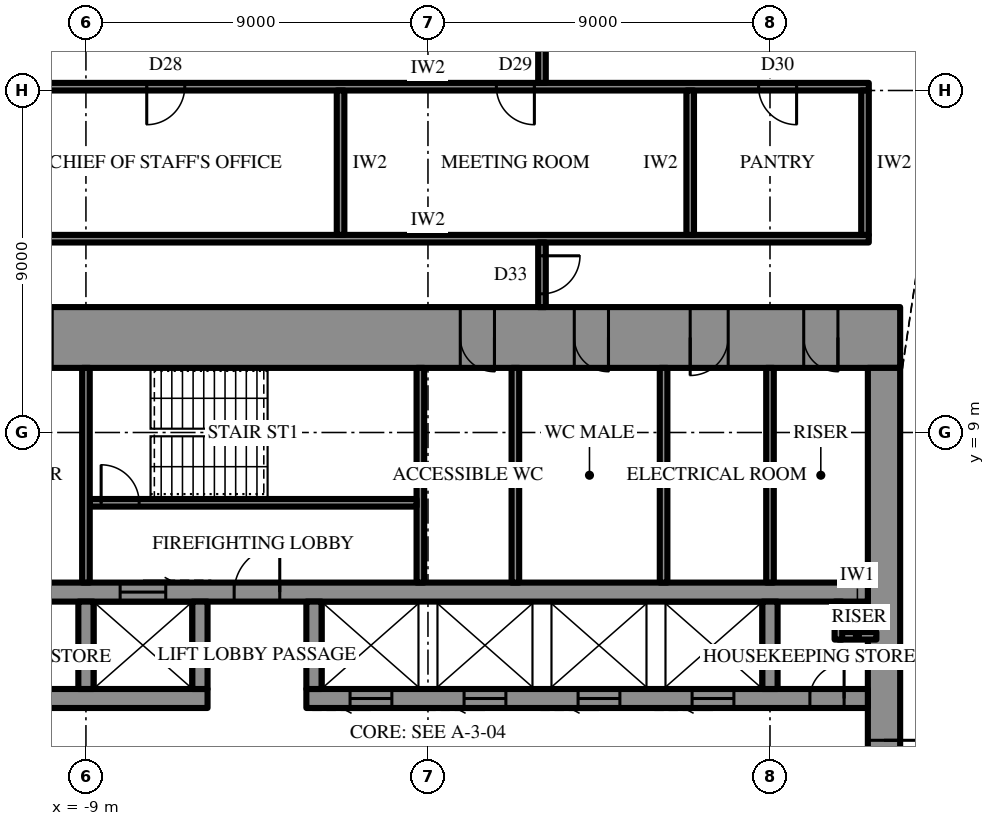
"""IFC4 building model, lengths in metres.
Left out: names, types, materials, properties, quantities, classifications, styles, units other than length and angle.
Written with IfcOpenShell. Run it as: python <this file> out.ifc"""

import sys

from ifc_helpers import new_model, si_unit, direction, frame, frame_2d, origin, place, context, subcontext, project, spatial, rectangle, extrude, element, fill, save


model = new_model("IFC4")
c1 = context("Model", 3, precision=1e-05, world=origin(), true_north=direction((0.0, 1.0)))
c2 = subcontext(c1, "Body", "Model", "MODEL_VIEW")
j1 = project(units=[si_unit("LENGTHUNIT", "METRE"), si_unit("PLANEANGLEUNIT", "RADIAN")], contexts=[c1])
p1 = place(None, origin())
s1 = spatial("IfcSite", under=j1, at=p1, CompositionType="ELEMENT")
p2 = place(p1, origin())
s2 = spatial("IfcBuilding", under=s1, at=p2, CompositionType="ELEMENT")
p3 = place(p2, frame((0.0, 0.0, 366.1)))
s3 = spatial("IfcBuildingStorey", under=s2, at=p3, CompositionType="ELEMENT", Elevation=366.1)
p4 = place(p3, frame((-12.425, 11.5, 0.0), z_axis=(0.0, 0.0, 1.0), x_axis=(1.0, 0.0, 0.0)))
e1 = element("IfcWall", 1, at=p4, inside=s3, PredefinedType="SHEAR", context=c2, shape_type="SweptSolid", body=[
    extrude(rectangle(XDim=24.85, YDim=1.6, at=frame_2d((12.425, 0.0))), origin(), (0.0, 0.0, 1.0), 4.2),
])
p5 = place(p4, frame((13.275, 0.0, 0.0)))
e2 = element("IfcOpeningElement", 2, at=p5, cuts=e1, PredefinedType="OPENING", context=c2, shape_type="SweptSolid", body=[
    extrude(rectangle(XDim=0.9, YDim=2.2, at=frame_2d((0.45, 1.1))), frame((0.0, 0.81, 0.0), z_axis=(0.0, -1.0, 0.0), x_axis=(1.0, 0.0, 0.0)), (0.0, 0.0, 1.0), 1.62),
])
p6 = place(p4, frame((16.275, 0.0, 0.0)))
e3 = element("IfcOpeningElement", 3, at=p6, cuts=e1, PredefinedType="OPENING", context=c2, shape_type="SweptSolid", body=[
    extrude(rectangle(XDim=0.9, YDim=2.2, at=frame_2d((0.45, 1.1))), frame((0.0, 0.81, 0.0), z_axis=(0.0, -1.0, 0.0), x_axis=(1.0, 0.0, 0.0)), (0.0, 0.0, 1.0), 1.62),
])
p7 = place(p4, frame((19.325, 0.0, 0.0)))
e4 = element("IfcOpeningElement", 4, at=p7, cuts=e1, PredefinedType="OPENING", context=c2, shape_type="SweptSolid", body=[
    extrude(rectangle(XDim=1.0, YDim=2.2, at=frame_2d((0.5, 1.1))), frame((0.0, 0.81, 0.0), z_axis=(0.0, -1.0, 0.0), x_axis=(1.0, 0.0, 0.0)), (0.0, 0.0, 1.0), 1.62),
])
p8 = place(p4, frame((1.637, 0.0, 0.0)))
e5 = element("IfcOpeningElement", 5, at=p8, cuts=e1, PredefinedType="OPENING", context=c2, shape_type="SweptSolid", body=[
    extrude(rectangle(XDim=0.9, YDim=2.2, at=frame_2d((0.45, 1.1))), frame((0.0, 0.81, 0.0), z_axis=(0.0, -1.0, 0.0), x_axis=(1.0, 0.0, 0.0)), (0.0, 0.0, 1.0), 1.62),
])
p9 = place(p4, frame((22.312, 0.0, 0.0)))
e6 = element("IfcOpeningElement", 6, at=p9, cuts=e1, PredefinedType="OPENING", context=c2, shape_type="SweptSolid", body=[
    extrude(rectangle(XDim=0.9, YDim=2.2, at=frame_2d((0.45, 1.1))), frame((0.0, 0.81, 0.0), z_axis=(0.0, -1.0, 0.0), x_axis=(1.0, 0.0, 0.0)), (0.0, 0.0, 1.0), 1.62),
])
p10 = place(p3, frame((12.0, -10.7, 0.0), z_axis=(0.0, 0.0, 1.0), x_axis=(0.0, 1.0, 0.0)))
e7 = element("IfcWall", 7, at=p10, inside=s3, PredefinedType="SHEAR", context=c2, shape_type="SweptSolid", body=[
    extrude(rectangle(XDim=21.4, YDim=0.85, at=frame_2d((10.7, 0.0))), origin(), (0.0, 0.0, 1.0), 4.2),
])
p11 = place(p10, frame((9.8, 0.0, 0.0)))
e8 = element("IfcOpeningElement", 8, at=p11, cuts=e7, PredefinedType="OPENING", context=c2, shape_type="SweptSolid", body=[
    extrude(rectangle(XDim=1.8, YDim=2.4, at=frame_2d((0.9, 1.2))), frame((0.0, 0.435, 0.0), z_axis=(0.0, -1.0, 0.0), x_axis=(1.0, 0.0, 0.0)), (0.0, 0.0, 1.0), 0.87),
])
p12 = place(p3, frame((-11.575, 2.0, 0.0), z_axis=(0.0, 0.0, 1.0), x_axis=(1.0, 0.0, 0.0)))
e9 = element("IfcWall", 9, at=p12, inside=s3, PredefinedType="SHEAR", context=c2, shape_type="SweptSolid", body=[
    extrude(rectangle(XDim=5.775, YDim=0.5, at=frame_2d((2.887, 0.0))), origin(), (0.0, 0.0, 1.0), 4.2),
])
p13 = place(p12, frame((0.625, 0.0, 0.0)))
e10 = element("IfcOpeningElement", 10, at=p13, cuts=e9, PredefinedType="OPENING", context=c2, shape_type="SweptSolid", body=[
    extrude(rectangle(XDim=0.9, YDim=2.2, at=frame_2d((0.45, 1.1))), frame((0.0, 0.26, 0.0), z_axis=(0.0, -1.0, 0.0), x_axis=(1.0, 0.0, 0.0)), (0.0, 0.0, 1.0), 0.52),
])
p14 = place(p3, frame((-3.2, 2.0, 0.0), z_axis=(0.0, 0.0, 1.0), x_axis=(1.0, 0.0, 0.0)))
e11 = element("IfcWall", 11, at=p14, inside=s3, PredefinedType="SHEAR", context=c2, shape_type="SweptSolid", body=[
    extrude(rectangle(XDim=14.775, YDim=0.5, at=frame_2d((7.387, 0.0))), origin(), (0.0, 0.0, 1.0), 4.2),
])
p15 = place(p14, frame((13.25, 0.0, 0.0)))
e12 = element("IfcOpeningElement", 12, at=p15, cuts=e11, PredefinedType="OPENING", context=c2, shape_type="SweptSolid", body=[
    extrude(rectangle(XDim=0.9, YDim=2.2, at=frame_2d((0.45, 1.1))), frame((0.0, 0.26, 0.0), z_axis=(0.0, -1.0, 0.0), x_axis=(1.0, 0.0, 0.0)), (0.0, 0.0, 1.0), 0.52),
])
p16 = place(p14, frame((1.15, 0.0, 0.0)))
e13 = element("IfcOpeningElement", 13, at=p16, cuts=e11, PredefinedType="OPENING", context=c2, shape_type="SweptSolid", body=[
    extrude(rectangle(XDim=1.1, YDim=2.2, at=frame_2d((0.55, 1.1))), frame((0.0, 0.26, 0.0), z_axis=(0.0, -1.0, 0.0), x_axis=(1.0, 0.0, 0.0)), (0.0, 0.0, 1.0), 0.52),
])
p17 = place(p14, frame((4.15, 0.0, 0.0)))
e14 = element("IfcOpeningElement", 14, at=p17, cuts=e11, PredefinedType="OPENING", context=c2, shape_type="SweptSolid", body=[
    extrude(rectangle(XDim=1.1, YDim=2.2, at=frame_2d((0.55, 1.1))), frame((0.0, 0.26, 0.0), z_axis=(0.0, -1.0, 0.0), x_axis=(1.0, 0.0, 0.0)), (0.0, 0.0, 1.0), 0.52),
])
p18 = place(p14, frame((7.15, 0.0, 0.0)))
e15 = element("IfcOpeningElement", 15, at=p18, cuts=e11, PredefinedType="OPENING", context=c2, shape_type="SweptSolid", body=[
    extrude(rectangle(XDim=1.1, YDim=2.2, at=frame_2d((0.55, 1.1))), frame((0.0, 0.26, 0.0), z_axis=(0.0, -1.0, 0.0), x_axis=(1.0, 0.0, 0.0)), (0.0, 0.0, 1.0), 0.52),
])
p19 = place(p14, frame((10.15, 0.0, 0.0)))
e16 = element("IfcOpeningElement", 16, at=p19, cuts=e11, PredefinedType="OPENING", context=c2, shape_type="SweptSolid", body=[
    extrude(rectangle(XDim=1.1, YDim=2.2, at=frame_2d((0.55, 1.1))), frame((0.0, 0.26, 0.0), z_axis=(0.0, -1.0, 0.0), x_axis=(1.0, 0.0, 0.0)), (0.0, 0.0, 1.0), 0.52),
])
p20 = place(p3, frame((-11.575, 4.8, 0.0), z_axis=(0.0, 0.0, 1.0), x_axis=(1.0, 0.0, 0.0)))
e17 = element("IfcWall", 17, at=p20, inside=s3, PredefinedType="SHEAR", context=c2, shape_type="SweptSolid", body=[
    extrude(rectangle(XDim=23.15, YDim=0.5, at=frame_2d((11.575, 0.0))), origin(), (0.0, 0.0, 1.0), 4.2),
])
p21 = place(p20, frame((6.475, 0.0, 0.0)))
e18 = element("IfcOpeningElement", 18, at=p21, cuts=e17, PredefinedType="OPENING", context=c2, shape_type="SweptSolid", body=[
    extrude(rectangle(XDim=1.2, YDim=2.2, at=frame_2d((0.6, 1.1))), frame((0.0, 0.26, 0.0), z_axis=(0.0, -1.0, 0.0), x_axis=(1.0, 0.0, 0.0)), (0.0, 0.0, 1.0), 0.52),
])
p22 = place(p20, frame((3.475, 0.0, 0.0)))
e19 = element("IfcOpeningElement", 19, at=p22, cuts=e17, PredefinedType="OPENING", context=c2, shape_type="SweptSolid", body=[
    extrude(rectangle(XDim=1.2, YDim=2.2, at=frame_2d((0.6, 1.1))), frame((0.0, 0.26, 0.0), z_axis=(0.0, -1.0, 0.0), x_axis=(1.0, 0.0, 0.0)), (0.0, 0.0, 1.0), 0.52),
])
for number, where, z_axis, x_axis in (
    (20, (-9.0, 2.25, 0.0), (0.0, 0.0, 1.0), (0.0, 1.0, 0.0)),
    (21, (-6.0, 2.25, 0.0), (0.0, 0.0, 1.0), (0.0, 1.0, 0.0)),
    (22, (-3.0, 2.25, 0.0), (0.0, 0.0, 1.0), (0.0, 1.0, 0.0)),
    (23, (9.0, 2.25, 0.0), (0.0, 0.0, 1.0), (0.0, 1.0, 0.0)),
):
    element("IfcWall", number, at=place(p3, frame(where, z_axis=z_axis, x_axis=x_axis)), inside=s3, PredefinedType="SHEAR", context=c2, shape_type="SweptSolid", body=[
        extrude(rectangle(XDim=2.3, YDim=0.4, at=frame_2d((1.15, 0.0))), origin(), (0.0, 0.0, 1.0), 4.2),
    ])
p23 = place(p3, frame((-0.2, 5.05, 0.0), z_axis=(0.0, 0.0, 1.0), x_axis=(0.0, 1.0, 0.0)))
e24 = element("IfcWall", 24, at=p23, inside=s3, PredefinedType="SHEAR", context=c2, shape_type="SweptSolid", body=[
    extrude(rectangle(XDim=5.65, YDim=0.2, at=frame_2d((2.825, 0.0))), origin(), (0.0, 0.0, 1.0), 4.2),
])
p24 = place(p3, frame((-8.9, 7.15, 0.0), z_axis=(0.0, 0.0, 1.0), x_axis=(1.0, 0.0, 0.0)))
e25 = element("IfcWall", 25, at=p24, inside=s3, PredefinedType="SHEAR", context=c2, shape_type="SweptSolid", body=[
    extrude(rectangle(XDim=8.6, YDim=0.2, at=frame_2d((4.3, 0.0))), origin(), (0.0, 0.0, 1.0), 4.2),
])
p25 = place(p24, frame((0.3, 0.0, 0.0)))
e26 = element("IfcOpeningElement", 26, at=p25, cuts=e25, PredefinedType="OPENING", context=c2, shape_type="SweptSolid", body=[
    extrude(rectangle(XDim=1.0, YDim=2.2, at=frame_2d((0.5, 1.1))), frame((0.0, 0.11, 0.0), z_axis=(0.0, -1.0, 0.0), x_axis=(1.0, 0.0, 0.0)), (0.0, 0.0, 1.0), 0.22),
])
for number, where, z_axis, x_axis in (
    (27, (-9.0, 5.05, 0.0), (0.0, 0.0, 1.0), (0.0, 1.0, 0.0)),
    (28, (9.0, 5.05, 0.0), (0.0, 0.0, 1.0), (0.0, 1.0, 0.0)),
    (29, (2.3, 5.05, 0.0), (0.0, 0.0, 1.0), (0.0, 1.0, 0.0)),
    (30, (6.2, 5.05, 0.0), (0.0, 0.0, 1.0), (0.0, 1.0, 0.0)),
):
    element("IfcWall", number, at=place(p3, frame(where, z_axis=z_axis, x_axis=x_axis)), inside=s3, PredefinedType="PARTITIONING", context=c2, shape_type="SweptSolid", body=[
        extrude(rectangle(XDim=5.65, YDim=0.2, at=frame_2d((2.825, 0.0))), origin(), (0.0, 0.0, 1.0), 4.0),
    ])
for number, where, z_axis, x_axis in (
    (31, (10.8, 3.65, 0.0), (0.0, 0.0, 1.0), (1.0, 0.0, 0.0)),
    (32, (10.8, 3.55, 0.0), (0.0, 0.0, 1.0), (0.0, 1.0, 0.0)),
):
    element("IfcWall", number, at=place(p3, frame(where, z_axis=z_axis, x_axis=x_axis)), inside=s3, PredefinedType="PARTITIONING", context=c2, shape_type="SweptSolid", body=[
        extrude(rectangle(XDim=1.0, YDim=0.2, at=frame_2d((0.5, 0.0))), origin(), (0.0, 0.0, 1.0), 4.0),
    ])
p26 = place(p3, frame((-11.6, 14.1, 0.0), z_axis=(0.0, 0.0, 1.0), x_axis=(1.0, 0.0, 0.0)))
e33 = element("IfcWall", 33, at=p26, inside=s3, PredefinedType="PARTITIONING", context=c2, shape_type="SweptSolid", body=[
    extrude(rectangle(XDim=23.2, YDim=0.2, at=frame_2d((11.6, 0.0))), origin(), (0.0, 0.0, 1.0), 4.0),
])
p27 = place(p3, frame((-11.6, 18.1, 0.0), z_axis=(0.0, 0.0, 1.0), x_axis=(1.0, 0.0, 0.0)))
e34 = element("IfcWall", 34, at=p27, inside=s3, PredefinedType="PARTITIONING", context=c2, shape_type="SweptSolid", body=[
    extrude(rectangle(XDim=23.2, YDim=0.2, at=frame_2d((11.6, 0.0))), origin(), (0.0, 0.0, 1.0), 4.0),
])
p28 = place(p27, frame((4.2, 0.0, 0.0)))
e35 = element("IfcOpeningElement", 35, at=p28, cuts=e34, PredefinedType="OPENING", context=c2, shape_type="SweptSolid", body=[
    extrude(rectangle(XDim=1.0, YDim=2.2, at=frame_2d((0.5, 1.1))), frame((0.0, 0.11, 0.0), z_axis=(0.0, -1.0, 0.0), x_axis=(1.0, 0.0, 0.0)), (0.0, 0.0, 1.0), 0.22),
])
p29 = place(p27, frame((13.4, 0.0, 0.0)))
e36 = element("IfcOpeningElement", 36, at=p29, cuts=e34, PredefinedType="OPENING", context=c2, shape_type="SweptSolid", body=[
    extrude(rectangle(XDim=1.0, YDim=2.2, at=frame_2d((0.5, 1.1))), frame((0.0, 0.11, 0.0), z_axis=(0.0, -1.0, 0.0), x_axis=(1.0, 0.0, 0.0)), (0.0, 0.0, 1.0), 0.22),
])
p30 = place(p27, frame((20.3, 0.0, 0.0)))
e37 = element("IfcOpeningElement", 37, at=p30, cuts=e34, PredefinedType="OPENING", context=c2, shape_type="SweptSolid", body=[
    extrude(rectangle(XDim=1.0, YDim=2.2, at=frame_2d((0.5, 1.1))), frame((0.0, 0.11, 0.0), z_axis=(0.0, -1.0, 0.0), x_axis=(1.0, 0.0, 0.0)), (0.0, 0.0, 1.0), 0.22),
])
for number, where, z_axis, x_axis in (
    (38, (-2.3, 14.2, 0.0), (0.0, 0.0, 1.0), (0.0, 1.0, 0.0)),
    (39, (6.9, 14.2, 0.0), (0.0, 0.0, 1.0), (0.0, 1.0, 0.0)),
    (40, (11.5, 14.2, 0.0), (0.0, 0.0, 1.0), (0.0, 1.0, 0.0)),
):
    element("IfcWall", number, at=place(p3, frame(where, z_axis=z_axis, x_axis=x_axis)), inside=s3, PredefinedType="PARTITIONING", context=c2, shape_type="SweptSolid", body=[
        extrude(rectangle(XDim=3.8, YDim=0.2, at=frame_2d((1.9, 0.0))), origin(), (0.0, 0.0, 1.0), 4.0),
    ])
p31 = place(p3, frame((3.0, 12.3, 0.0), z_axis=(0.0, 0.0, 1.0), x_axis=(0.0, 1.0, 0.0)))
e41 = element("IfcWall", 41, at=p31, inside=s3, PredefinedType="PARTITIONING", context=c2, shape_type="SweptSolid", body=[
    extrude(rectangle(XDim=1.7, YDim=0.2, at=frame_2d((0.85, 0.0))), origin(), (0.0, 0.0, 1.0), 4.0),
])
p32 = place(p31, frame((0.35, 0.0, 0.0)))
e42 = element("IfcOpeningElement", 42, at=p32, cuts=e41, PredefinedType="OPENING", context=c2, shape_type="SweptSolid", body=[
    extrude(rectangle(XDim=1.0, YDim=2.2, at=frame_2d((0.5, 1.1))), frame((0.0, 0.11, 0.0), z_axis=(0.0, -1.0, 0.0), x_axis=(1.0, 0.0, 0.0)), (0.0, 0.0, 1.0), 0.22),
])
p33 = place(p3, frame((3.0, 18.2, 0.0), z_axis=(0.0, 0.0, 1.0), x_axis=(0.0, 1.0, 0.0)))
e43 = element("IfcWall", 43, at=p33, inside=s3, PredefinedType="PARTITIONING", context=c2, shape_type="SweptSolid", body=[
    extrude(rectangle(XDim=3.45, YDim=0.2, at=frame_2d((1.725, 0.0))), origin(), (0.0, 0.0, 1.0), 4.0),
])
p34 = place(p11, frame((1.8, 0.0, 0.0), z_axis=(0.0, 0.0, 1.0), x_axis=(-1.0, 0.0, 0.0)))
e44 = element("IfcDoor", 44, at=p34, inside=s3, OperationType="DOUBLE_DOOR_SINGLE_SWING", PredefinedType="DOOR", context=c2, shape_type="SweptSolid", body=[
    extrude(rectangle(XDim=1.8, YDim=2.4, at=frame_2d((0.9, 1.2))), frame((0.0, 0.025, 0.0), z_axis=(0.0, -1.0, 0.0), x_axis=(1.0, 0.0, 0.0)), (0.0, 0.0, 1.0), 0.05),
])
fill(e8, e44)
p35 = place(p21, origin())
e45 = element("IfcDoor", 45, at=p35, inside=s3, OperationType="SINGLE_SWING_LEFT", PredefinedType="DOOR", context=c2, shape_type="SweptSolid", body=[
    extrude(rectangle(XDim=1.2, YDim=2.2, at=frame_2d((0.6, 1.1))), frame((0.0, 0.025, 0.0), z_axis=(0.0, -1.0, 0.0), x_axis=(1.0, 0.0, 0.0)), (0.0, 0.0, 1.0), 0.05),
])
fill(e18, e45)
p36 = place(p25, origin())
e46 = element("IfcDoor", 46, at=p36, inside=s3, OperationType="SINGLE_SWING_RIGHT", PredefinedType="DOOR", context=c2, shape_type="SweptSolid", body=[
    extrude(rectangle(XDim=1.0, YDim=2.2, at=frame_2d((0.5, 1.1))), frame((0.0, 0.025, 0.0), z_axis=(0.0, -1.0, 0.0), x_axis=(1.0, 0.0, 0.0)), (0.0, 0.0, 1.0), 0.05),
])
fill(e26, e46)
p37 = place(p5, frame((0.9, 0.0, 0.0), z_axis=(0.0, 0.0, 1.0), x_axis=(-1.0, 0.0, 0.0)))
e47 = element("IfcDoor", 47, at=p37, inside=s3, OperationType="SINGLE_SWING_RIGHT", PredefinedType="DOOR", context=c2, shape_type="SweptSolid", body=[
    extrude(rectangle(XDim=0.9, YDim=2.2, at=frame_2d((0.45, 1.1))), frame((0.0, 0.025, 0.0), z_axis=(0.0, -1.0, 0.0), x_axis=(1.0, 0.0, 0.0)), (0.0, 0.0, 1.0), 0.05),
])
fill(e2, e47)
p38 = place(p6, frame((0.9, 0.0, 0.0), z_axis=(0.0, 0.0, 1.0), x_axis=(-1.0, 0.0, 0.0)))
e48 = element("IfcDoor", 48, at=p38, inside=s3, OperationType="SINGLE_SWING_RIGHT", PredefinedType="DOOR", context=c2, shape_type="SweptSolid", body=[
    extrude(rectangle(XDim=0.9, YDim=2.2, at=frame_2d((0.45, 1.1))), frame((0.0, 0.025, 0.0), z_axis=(0.0, -1.0, 0.0), x_axis=(1.0, 0.0, 0.0)), (0.0, 0.0, 1.0), 0.05),
])
fill(e3, e48)
p39 = place(p7, frame((1.0, 0.0, 0.0), z_axis=(0.0, 0.0, 1.0), x_axis=(-1.0, 0.0, 0.0)))
e49 = element("IfcDoor", 49, at=p39, inside=s3, OperationType="SINGLE_SWING_LEFT", PredefinedType="DOOR", context=c2, shape_type="SweptSolid", body=[
    extrude(rectangle(XDim=1.0, YDim=2.2, at=frame_2d((0.5, 1.1))), frame((0.0, 0.025, 0.0), z_axis=(0.0, -1.0, 0.0), x_axis=(1.0, 0.0, 0.0)), (0.0, 0.0, 1.0), 0.05),
])
fill(e4, e49)
p40 = place(p8, frame((0.9, 0.0, 0.0), z_axis=(0.0, 0.0, 1.0), x_axis=(-1.0, 0.0, 0.0)))
e50 = element("IfcDoor", 50, at=p40, inside=s3, OperationType="SINGLE_SWING_LEFT", PredefinedType="DOOR", context=c2, shape_type="SweptSolid", body=[
    extrude(rectangle(XDim=0.9, YDim=2.2, at=frame_2d((0.45, 1.1))), frame((0.0, 0.025, 0.0), z_axis=(0.0, -1.0, 0.0), x_axis=(1.0, 0.0, 0.0)), (0.0, 0.0, 1.0), 0.05),
])
fill(e5, e50)
p41 = place(p9, frame((0.9, 0.0, 0.0), z_axis=(0.0, 0.0, 1.0), x_axis=(-1.0, 0.0, 0.0)))
e51 = element("IfcDoor", 51, at=p41, inside=s3, OperationType="SINGLE_SWING_RIGHT", PredefinedType="DOOR", context=c2, shape_type="SweptSolid", body=[
    extrude(rectangle(XDim=0.9, YDim=2.2, at=frame_2d((0.45, 1.1))), frame((0.0, 0.025, 0.0), z_axis=(0.0, -1.0, 0.0), x_axis=(1.0, 0.0, 0.0)), (0.0, 0.0, 1.0), 0.05),
])
fill(e6, e51)
p42 = place(p15, origin())
e52 = element("IfcDoor", 52, at=p42, inside=s3, OperationType="SINGLE_SWING_LEFT", PredefinedType="DOOR", context=c2, shape_type="SweptSolid", body=[
    extrude(rectangle(XDim=0.9, YDim=2.2, at=frame_2d((0.45, 1.1))), frame((0.0, 0.025, 0.0), z_axis=(0.0, -1.0, 0.0), x_axis=(1.0, 0.0, 0.0)), (0.0, 0.0, 1.0), 0.05),
])
fill(e12, e52)
p43 = place(p22, origin())
e53 = element("IfcDoor", 53, at=p43, inside=s3, OperationType="SLIDING_TO_LEFT", PredefinedType="DOOR", context=c2, shape_type="SweptSolid", body=[
    extrude(rectangle(XDim=1.2, YDim=2.2, at=frame_2d((0.6, 1.1))), frame((0.0, 0.025, 0.0), z_axis=(0.0, -1.0, 0.0), x_axis=(1.0, 0.0, 0.0)), (0.0, 0.0, 1.0), 0.05),
])
fill(e19, e53)
p44 = place(p16, frame((1.1, 0.0, 0.0), z_axis=(0.0, 0.0, 1.0), x_axis=(-1.0, 0.0, 0.0)))
e54 = element("IfcDoor", 54, at=p44, inside=s3, OperationType="SLIDING_TO_LEFT", PredefinedType="DOOR", context=c2, shape_type="SweptSolid", body=[
    extrude(rectangle(XDim=1.1, YDim=2.2, at=frame_2d((0.55, 1.1))), frame((0.0, 0.025, 0.0), z_axis=(0.0, -1.0, 0.0), x_axis=(1.0, 0.0, 0.0)), (0.0, 0.0, 1.0), 0.05),
])
fill(e13, e54)
p45 = place(p17, frame((1.1, 0.0, 0.0), z_axis=(0.0, 0.0, 1.0), x_axis=(-1.0, 0.0, 0.0)))
e55 = element("IfcDoor", 55, at=p45, inside=s3, OperationType="SLIDING_TO_LEFT", PredefinedType="DOOR", context=c2, shape_type="SweptSolid", body=[
    extrude(rectangle(XDim=1.1, YDim=2.2, at=frame_2d((0.55, 1.1))), frame((0.0, 0.025, 0.0), z_axis=(0.0, -1.0, 0.0), x_axis=(1.0, 0.0, 0.0)), (0.0, 0.0, 1.0), 0.05),
])
fill(e14, e55)
p46 = place(p18, frame((1.1, 0.0, 0.0), z_axis=(0.0, 0.0, 1.0), x_axis=(-1.0, 0.0, 0.0)))
e56 = element("IfcDoor", 56, at=p46, inside=s3, OperationType="SLIDING_TO_LEFT", PredefinedType="DOOR", context=c2, shape_type="SweptSolid", body=[
    extrude(rectangle(XDim=1.1, YDim=2.2, at=frame_2d((0.55, 1.1))), frame((0.0, 0.025, 0.0), z_axis=(0.0, -1.0, 0.0), x_axis=(1.0, 0.0, 0.0)), (0.0, 0.0, 1.0), 0.05),
])
fill(e15, e56)
p47 = place(p19, frame((1.1, 0.0, 0.0), z_axis=(0.0, 0.0, 1.0), x_axis=(-1.0, 0.0, 0.0)))
e57 = element("IfcDoor", 57, at=p47, inside=s3, OperationType="SLIDING_TO_LEFT", PredefinedType="DOOR", context=c2, shape_type="SweptSolid", body=[
    extrude(rectangle(XDim=1.1, YDim=2.2, at=frame_2d((0.55, 1.1))), frame((0.0, 0.025, 0.0), z_axis=(0.0, -1.0, 0.0), x_axis=(1.0, 0.0, 0.0)), (0.0, 0.0, 1.0), 0.05),
])
fill(e16, e57)
p48 = place(p28, frame((1.0, 0.0, 0.0), z_axis=(0.0, 0.0, 1.0), x_axis=(-1.0, 0.0, 0.0)))
e58 = element("IfcDoor", 58, at=p48, inside=s3, OperationType="SINGLE_SWING_LEFT", PredefinedType="DOOR", context=c2, shape_type="SweptSolid", body=[
    extrude(rectangle(XDim=1.0, YDim=2.2, at=frame_2d((0.5, 1.1))), frame((0.0, 0.025, 0.0), z_axis=(0.0, -1.0, 0.0), x_axis=(1.0, 0.0, 0.0)), (0.0, 0.0, 1.0), 0.05),
])
fill(e35, e58)
p49 = place(p29, frame((1.0, 0.0, 0.0), z_axis=(0.0, 0.0, 1.0), x_axis=(-1.0, 0.0, 0.0)))
e59 = element("IfcDoor", 59, at=p49, inside=s3, OperationType="SINGLE_SWING_RIGHT", PredefinedType="DOOR", context=c2, shape_type="SweptSolid", body=[
    extrude(rectangle(XDim=1.0, YDim=2.2, at=frame_2d((0.5, 1.1))), frame((0.0, 0.025, 0.0), z_axis=(0.0, -1.0, 0.0), x_axis=(1.0, 0.0, 0.0)), (0.0, 0.0, 1.0), 0.05),
])
fill(e36, e59)
p50 = place(p30, frame((1.0, 0.0, 0.0), z_axis=(0.0, 0.0, 1.0), x_axis=(-1.0, 0.0, 0.0)))
e60 = element("IfcDoor", 60, at=p50, inside=s3, OperationType="SINGLE_SWING_RIGHT", PredefinedType="DOOR", context=c2, shape_type="SweptSolid", body=[
    extrude(rectangle(XDim=1.0, YDim=2.2, at=frame_2d((0.5, 1.1))), frame((0.0, 0.025, 0.0), z_axis=(0.0, -1.0, 0.0), x_axis=(1.0, 0.0, 0.0)), (0.0, 0.0, 1.0), 0.05),
])
fill(e37, e60)
p51 = place(p32, frame((1.0, 0.0, 0.0), z_axis=(0.0, 0.0, 1.0), x_axis=(-1.0, 0.0, 0.0)))
e61 = element("IfcDoor", 61, at=p51, inside=s3, OperationType="SINGLE_SWING_RIGHT", PredefinedType="DOOR", context=c2, shape_type="SweptSolid", body=[
    extrude(rectangle(XDim=1.0, YDim=2.2, at=frame_2d((0.5, 1.1))), frame((0.0, 0.025, 0.0), z_axis=(0.0, -1.0, 0.0), x_axis=(1.0, 0.0, 0.0)), (0.0, 0.0, 1.0), 0.05),
])
fill(e42, e61)
save(model, sys.argv[1])
